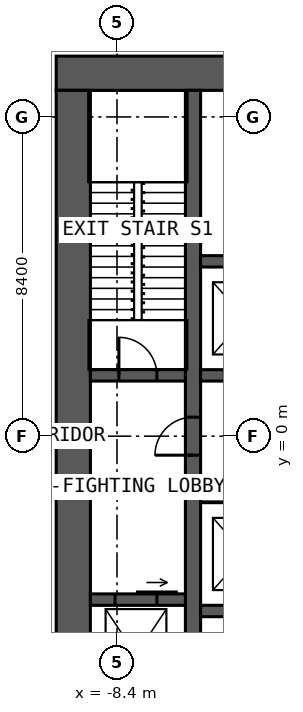
"""IFC4 building model, lengths in metres.
Left out: names, types, materials, properties, quantities, classifications, styles, units other than length and angle.
Written with IfcOpenShell. Run it as: python <this file> out.ifc"""

import sys

from ifc_helpers import new_model, si_unit, direction, frame, frame_2d, origin, place, context, subcontext, project, spatial, rectangle, extrude, element, fill, save


model = new_model("IFC4")
c1 = context("Model", 3, precision=1e-05, world=origin(), true_north=direction((0.0, 1.0)))
c2 = subcontext(c1, "Body", "Model", "MODEL_VIEW")
j1 = project(units=[si_unit("LENGTHUNIT", "METRE"), si_unit("PLANEANGLEUNIT", "RADIAN")], contexts=[c1])
p1 = place(None, origin())
s1 = spatial("IfcSite", under=j1, at=p1, CompositionType="ELEMENT")
p2 = place(p1, origin())
s2 = spatial("IfcBuilding", under=s1, at=p2, CompositionType="ELEMENT")
p3 = place(p2, frame((0.0, 0.0, 16.0)))
s3 = spatial("IfcBuildingStorey", under=s2, at=p3, CompositionType="ELEMENT", Elevation=16.0)
p4 = place(p3, frame((-10.0, 9.55, 0.0), z_axis=(0.0, 0.0, 1.0), x_axis=(1.0, 0.0, 0.0)))
e1 = element("IfcWall", 1, at=p4, inside=s3, PredefinedType="SOLIDWALL", context=c2, shape_type="SweptSolid", body=[
    extrude(rectangle(XDim=20.0, YDim=0.9, at=frame_2d((10.0, 0.0))), origin(), (0.0, 0.0, 1.0), 5.0),
])
p5 = place(p4, frame((9.4, 0.0, 0.0)))
e2 = element("IfcOpeningElement", 2, at=p5, cuts=e1, PredefinedType="OPENING", context=c2, shape_type="SweptSolid", body=[
    extrude(rectangle(XDim=1.2, YDim=2.2, at=frame_2d((0.6, 1.1))), frame((0.0, 0.46, 0.0), z_axis=(0.0, -1.0, 0.0), x_axis=(1.0, 0.0, 0.0)), (0.0, 0.0, 1.0), 0.92),
])
p6 = place(p3, frame((-9.55, 9.1, 0.0), z_axis=(0.0, 0.0, 1.0), x_axis=(0.0, -1.0, 0.0)))
e3 = element("IfcWall", 3, at=p6, inside=s3, PredefinedType="SOLIDWALL", context=c2, shape_type="SweptSolid", body=[
    extrude(rectangle(XDim=18.2, YDim=0.9, at=frame_2d((9.1, 0.0))), origin(), (0.0, 0.0, 1.0), 5.0),
])
p7 = place(p3, frame((-6.4, -9.1, 0.0), z_axis=(0.0, 0.0, 1.0), x_axis=(0.0, 1.0, 0.0)))
e4 = element("IfcWall", 4, at=p7, inside=s3, PredefinedType="SOLIDWALL", context=c2, shape_type="SweptSolid", body=[
    extrude(rectangle(XDim=18.2, YDim=0.4, at=frame_2d((9.1, 0.0))), origin(), (0.0, 0.0, 1.0), 5.0),
])
p8 = place(p7, frame((8.6, 0.0, 0.0)))
e5 = element("IfcOpeningElement", 5, at=p8, cuts=e4, PredefinedType="OPENING", context=c2, shape_type="SweptSolid", body=[
    extrude(rectangle(XDim=1.0, YDim=2.2, at=frame_2d((0.5, 1.1))), frame((0.0, 0.21, 0.0), z_axis=(0.0, -1.0, 0.0), x_axis=(1.0, 0.0, 0.0)), (0.0, 0.0, 1.0), 0.42),
])
p9 = place(p3, frame((-6.2, 1.6, 0.0), z_axis=(0.0, 0.0, 1.0), x_axis=(1.0, 0.0, 0.0)))
e6 = element("IfcWall", 6, at=p9, inside=s3, PredefinedType="SOLIDWALL", context=c2, shape_type="SweptSolid", body=[
    extrude(rectangle(XDim=4.85, YDim=0.3, at=frame_2d((2.425, 0.0))), origin(), (0.0, 0.0, 1.0), 5.0),
])
p10 = place(p9, frame((0.625, 0.0, 0.0)))
e7 = element("IfcOpeningElement", 7, at=p10, cuts=e6, PredefinedType="OPENING", context=c2, shape_type="SweptSolid", body=[
    extrude(rectangle(XDim=1.1, YDim=2.2, at=frame_2d((0.55, 1.1))), frame((0.0, 0.16, 0.0), z_axis=(0.0, -1.0, 0.0), x_axis=(1.0, 0.0, 0.0)), (0.0, 0.0, 1.0), 0.32),
])
p11 = place(p9, frame((3.15, 0.0, 0.0)))
e8 = element("IfcOpeningElement", 8, at=p11, cuts=e6, PredefinedType="OPENING", context=c2, shape_type="SweptSolid", body=[
    extrude(rectangle(XDim=1.1, YDim=2.2, at=frame_2d((0.55, 1.1))), frame((0.0, 0.16, 0.0), z_axis=(0.0, -1.0, 0.0), x_axis=(1.0, 0.0, 0.0)), (0.0, 0.0, 1.0), 0.32),
])
p12 = place(p3, frame((-6.2, 4.6, 0.0), z_axis=(0.0, 0.0, 1.0), x_axis=(1.0, 0.0, 0.0)))
e9 = element("IfcWall", 9, at=p12, inside=s3, PredefinedType="SOLIDWALL", context=c2, shape_type="SweptSolid", body=[
    extrude(rectangle(XDim=4.85, YDim=0.3, at=frame_2d((2.425, 0.0))), origin(), (0.0, 0.0, 1.0), 5.0),
])
for number, where, z_axis, x_axis in (
    (10, (-6.2, -1.6, 0.0), (0.0, 0.0, 1.0), (1.0, 0.0, 0.0)),
    (11, (-6.2, -4.6, 0.0), (0.0, 0.0, 1.0), (1.0, 0.0, 0.0)),
):
    element("IfcWall", number, at=place(p3, frame(where, z_axis=z_axis, x_axis=x_axis)), inside=s3, PredefinedType="SOLIDWALL", context=c2, shape_type="SweptSolid", body=[
        extrude(rectangle(XDim=7.4, YDim=0.3, at=frame_2d((3.7, 0.0))), origin(), (0.0, 0.0, 1.0), 5.0),
    ])
p13 = place(p3, frame((-9.1, 1.6, 0.0), z_axis=(0.0, 0.0, 1.0), x_axis=(1.0, 0.0, 0.0)))
e12 = element("IfcWall", 12, at=p13, inside=s3, PredefinedType="SOLIDWALL", context=c2, shape_type="SweptSolid", body=[
    extrude(rectangle(XDim=2.5, YDim=0.3, at=frame_2d((1.25, 0.0))), origin(), (0.0, 0.0, 1.0), 5.0),
])
p14 = place(p13, frame((0.75, 0.0, 0.0)))
e13 = element("IfcOpeningElement", 13, at=p14, cuts=e12, PredefinedType="OPENING", context=c2, shape_type="SweptSolid", body=[
    extrude(rectangle(XDim=1.0, YDim=2.2, at=frame_2d((0.5, 1.1))), frame((0.0, 0.16, 0.0), z_axis=(0.0, -1.0, 0.0), x_axis=(1.0, 0.0, 0.0)), (0.0, 0.0, 1.0), 0.32),
])
p15 = place(p3, frame((-9.1, -4.3, 0.0), z_axis=(0.0, 0.0, 1.0), x_axis=(1.0, 0.0, 0.0)))
e14 = element("IfcWall", 14, at=p15, inside=s3, PredefinedType="SOLIDWALL", context=c2, shape_type="SweptSolid", body=[
    extrude(rectangle(XDim=2.5, YDim=0.3, at=frame_2d((1.25, 0.0))), origin(), (0.0, 0.0, 1.0), 5.0),
])
p16 = place(p15, frame((0.65, 0.0, 0.0)))
e15 = element("IfcOpeningElement", 15, at=p16, cuts=e14, PredefinedType="OPENING", context=c2, shape_type="SweptSolid", body=[
    extrude(rectangle(XDim=1.1, YDim=2.2, at=frame_2d((0.55, 1.1))), frame((0.0, 0.16, 0.0), z_axis=(0.0, -1.0, 0.0), x_axis=(1.0, 0.0, 0.0)), (0.0, 0.0, 1.0), 0.32),
])
p17 = place(p8, origin())
e16 = element("IfcDoor", 16, at=p17, inside=s3, OperationType="SINGLE_SWING_LEFT", PredefinedType="DOOR", context=c2, shape_type="SweptSolid", body=[
    extrude(rectangle(XDim=1.0, YDim=2.2, at=frame_2d((0.5, 1.1))), frame((0.0, 0.025, 0.0), z_axis=(0.0, -1.0, 0.0), x_axis=(1.0, 0.0, 0.0)), (0.0, 0.0, 1.0), 0.05),
])
fill(e5, e16)
p18 = place(p14, origin())
e17 = element("IfcDoor", 17, at=p18, inside=s3, OperationType="SINGLE_SWING_LEFT", PredefinedType="DOOR", context=c2, shape_type="SweptSolid", body=[
    extrude(rectangle(XDim=1.0, YDim=2.2, at=frame_2d((0.5, 1.1))), frame((0.0, 0.025, 0.0), z_axis=(0.0, -1.0, 0.0), x_axis=(1.0, 0.0, 0.0)), (0.0, 0.0, 1.0), 0.05),
])
fill(e13, e17)
p19 = place(p16, origin())
e18 = element("IfcDoor", 18, at=p19, inside=s3, OperationType="SLIDING_TO_LEFT", PredefinedType="DOOR", context=c2, shape_type="SweptSolid", body=[
    extrude(rectangle(XDim=1.1, YDim=2.2, at=frame_2d((0.55, 1.1))), frame((0.0, 0.025, 0.0), z_axis=(0.0, -1.0, 0.0), x_axis=(1.0, 0.0, 0.0)), (0.0, 0.0, 1.0), 0.05),
])
fill(e15, e18)
save(model, sys.argv[1])
